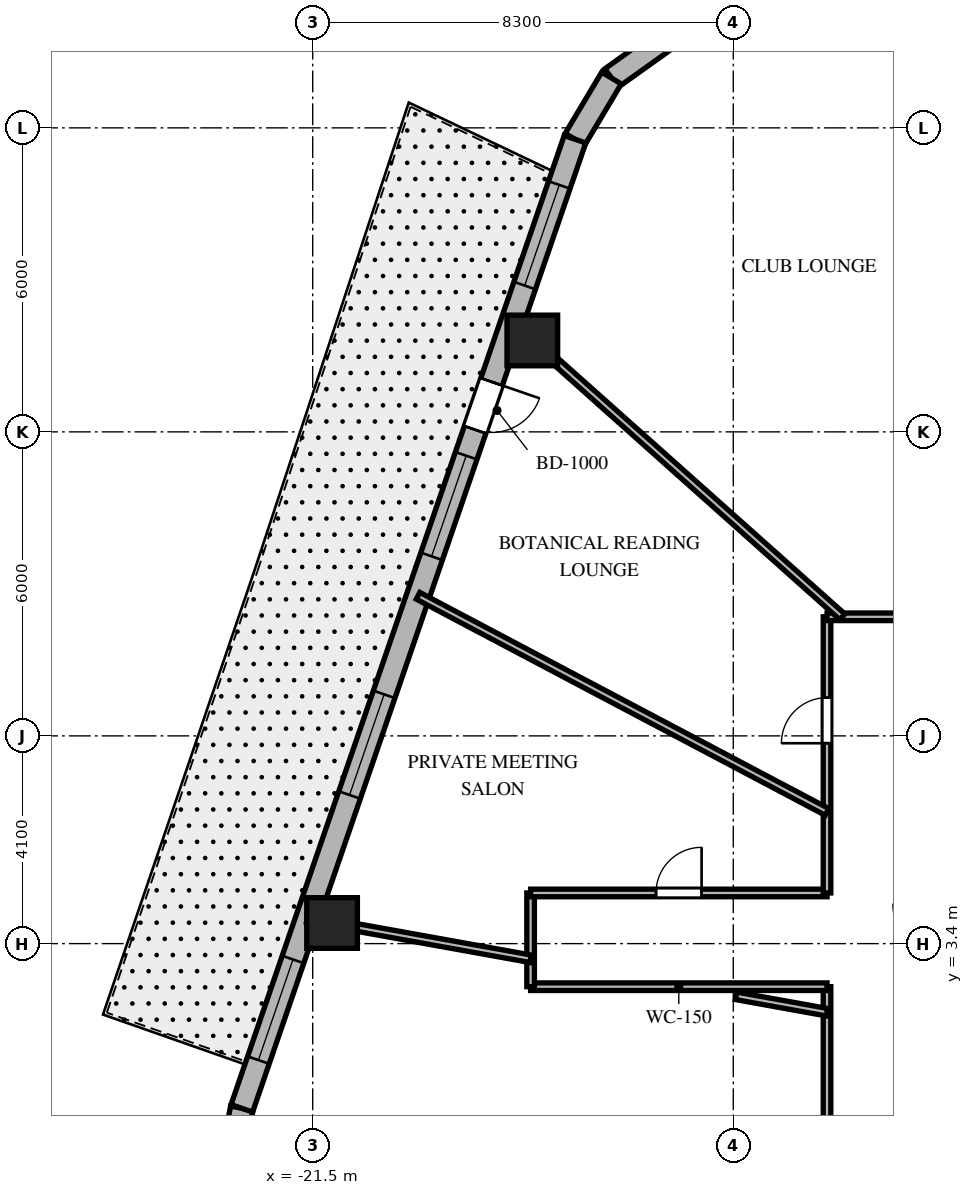
"""IFC4 building model, lengths in metres.
Left out: names, types, materials, properties, quantities, classifications, styles, units other than length and angle.
Written with IfcOpenShell. Run it as: python <this file> out.ifc"""

import sys

from ifc_helpers import new_model, si_unit, direction, frame, frame_2d, origin, origin_2d, place, context, subcontext, project, spatial, rectangle, extrude, element, fill, save


model = new_model("IFC4")
c1 = context("Model", 3, precision=1e-05, world=origin(), true_north=direction((0.0, 1.0)))
c2 = subcontext(c1, "Body", "Model", "MODEL_VIEW")
j1 = project(units=[si_unit("LENGTHUNIT", "METRE"), si_unit("PLANEANGLEUNIT", "RADIAN")], contexts=[c1])
p1 = place(None, origin())
s1 = spatial("IfcSite", under=j1, at=p1, CompositionType="ELEMENT")
p2 = place(p1, origin())
s2 = spatial("IfcBuilding", under=s1, at=p2, CompositionType="ELEMENT")
p3 = place(p2, frame((0.0, 0.0, 236.9)))
s3 = spatial("IfcBuildingStorey", under=s2, at=p3, CompositionType="ELEMENT", Elevation=236.9)
for number, where, z_axis, x_axis in (
    (1, (-17.166, 15.304, 0.0), (0.0, 0.0, 1.0), (1.0, 0.0, 0.0)),
    (2, (-21.118, 3.807, 0.0), (0.0, 0.0, 1.0), (1.0, 0.0, 0.0)),
):
    element("IfcColumn", number, at=place(p3, frame(where, z_axis=z_axis, x_axis=x_axis)), inside=s3, PredefinedType="COLUMN", context=c2, shape_type="SweptSolid", body=[
        extrude(rectangle(XDim=1.0, YDim=1.0, at=origin_2d()), origin(), (0.0, 0.0, 1.0), 3.8),
    ])
p4 = place(p3, frame((-14.478, 21.287, 0.0), z_axis=(0.0, 0.0, 1.0), x_axis=(-0.813888518617, -0.58102106611, 0.0)))
e3 = element("IfcWall", 3, at=p4, inside=s3, PredefinedType="SOLIDWALL", context=c2, shape_type="SweptSolid", body=[
    extrude(rectangle(XDim=1.383, YDim=0.45, at=frame_2d((0.691, 0.0))), origin(), (0.0, 0.0, 1.0), 3.5),
])
p5 = place(p3, frame((-15.604, 20.483, 0.0), z_axis=(0.0, 0.0, 1.0), x_axis=(-0.512222149036, -0.858852996756, 0.0)))
e4 = element("IfcWall", 4, at=p5, inside=s3, PredefinedType="SOLIDWALL", context=c2, shape_type="SweptSolid", body=[
    extrude(rectangle(XDim=1.406, YDim=0.45, at=frame_2d((0.703, 0.0))), origin(), (0.0, 0.0, 1.0), 3.5),
])
p6 = place(p3, frame((-22.898, 0.15, 0.0), z_axis=(0.0, 0.0, 1.0), x_axis=(-0.199055826889, -0.979988151858, 0.0)))
e5 = element("IfcWall", 5, at=p6, inside=s3, PredefinedType="SOLIDWALL", context=c2, shape_type="SweptSolid", body=[
    extrude(rectangle(XDim=0.894, YDim=0.45, at=frame_2d((0.447, 0.0))), origin(), (0.0, 0.0, 1.0), 3.5),
])
p7 = place(p3, frame((-16.324, 19.275, 0.0), z_axis=(0.0, 0.0, 1.0), x_axis=(-0.325083142304, -0.945685439557, 0.0)))
e6 = element("IfcWall", 6, at=p7, inside=s3, PredefinedType="SOLIDWALL", context=c2, shape_type="SweptSolid", body=[
    extrude(rectangle(XDim=20.224, YDim=0.45, at=frame_2d((10.112, 0.0))), origin(), (0.0, 0.0, 1.0), 3.5),
])
p8 = place(p7, frame((5.062, 0.0, 0.0)))
e7 = element("IfcOpeningElement", 7, at=p8, cuts=e6, PredefinedType="OPENING", context=c2, shape_type="SweptSolid", body=[
    extrude(rectangle(XDim=1.0, YDim=2.15, at=frame_2d((0.5, 1.075))), frame((0.0, 0.235, 0.0), z_axis=(0.0, -1.0, 0.0), x_axis=(1.0, 0.0, 0.0)), (0.0, 0.0, 1.0), 0.47),
])
p9 = place(p7, frame((0.953, 0.0, 0.8)))
e8 = element("IfcOpeningElement", 8, at=p9, cuts=e6, PredefinedType="OPENING", context=c2, shape_type="SweptSolid", body=[
    extrude(rectangle(XDim=2.1, YDim=1.85, at=frame_2d((1.05, 0.925))), frame((0.0, 0.235, 0.0), z_axis=(0.0, -1.0, 0.0), x_axis=(1.0, 0.0, 0.0)), (0.0, 0.0, 1.0), 0.47),
])
p10 = place(p7, frame((6.604, 0.0, 0.8)))
e9 = element("IfcOpeningElement", 9, at=p10, cuts=e6, PredefinedType="OPENING", context=c2, shape_type="SweptSolid", body=[
    extrude(rectangle(XDim=2.1, YDim=1.85, at=frame_2d((1.05, 0.925))), frame((0.0, 0.235, 0.0), z_axis=(0.0, -1.0, 0.0), x_axis=(1.0, 0.0, 0.0)), (0.0, 0.0, 1.0), 0.47),
])
p11 = place(p7, frame((11.585, 0.0, 0.8)))
e10 = element("IfcOpeningElement", 10, at=p11, cuts=e6, PredefinedType="OPENING", context=c2, shape_type="SweptSolid", body=[
    extrude(rectangle(XDim=2.1, YDim=1.85, at=frame_2d((1.05, 0.925))), frame((0.0, 0.235, 0.0), z_axis=(0.0, -1.0, 0.0), x_axis=(1.0, 0.0, 0.0)), (0.0, 0.0, 1.0), 0.47),
])
p12 = place(p7, frame((17.118, 0.0, 0.8)))
e11 = element("IfcOpeningElement", 11, at=p12, cuts=e6, PredefinedType="OPENING", context=c2, shape_type="SweptSolid", body=[
    extrude(rectangle(XDim=2.1, YDim=1.85, at=frame_2d((1.05, 0.925))), frame((0.0, 0.235, 0.0), z_axis=(0.0, -1.0, 0.0), x_axis=(1.0, 0.0, 0.0)), (0.0, 0.0, 1.0), 0.47),
])
p13 = place(p3, frame((-11.35, -9.85, 0.0), z_axis=(0.0, 0.0, 1.0), x_axis=(0.0, 1.0, 0.0)))
e12 = element("IfcWall", 12, at=p13, inside=s3, PredefinedType="PARTITIONING", context=c2, shape_type="SweptSolid", body=[
    extrude(rectangle(XDim=12.4, YDim=0.15, at=frame_2d((6.2, 0.0))), origin(), (0.0, 0.0, 1.0), 2.99),
])
p14 = place(p13, frame((8.835, 0.0, 0.0)))
e13 = element("IfcOpeningElement", 13, at=p14, cuts=e12, PredefinedType="OPENING", context=c2, shape_type="SweptSolid", body=[
    extrude(rectangle(XDim=0.95, YDim=2.03, at=frame_2d((0.475, 1.015))), frame((0.0, 0.085, 0.0), z_axis=(0.0, -1.0, 0.0), x_axis=(1.0, 0.0, 0.0)), (0.0, 0.0, 1.0), 0.17),
])
p15 = place(p13, frame((3.01, 0.0, 0.0)))
e14 = element("IfcOpeningElement", 14, at=p15, cuts=e12, PredefinedType="OPENING", context=c2, shape_type="SweptSolid", body=[
    extrude(rectangle(XDim=0.95, YDim=2.03, at=frame_2d((0.475, 1.015))), frame((0.0, 0.085, 0.0), z_axis=(0.0, -1.0, 0.0), x_axis=(1.0, 0.0, 0.0)), (0.0, 0.0, 1.0), 0.17),
])
p16 = place(p3, frame((-11.35, 2.55, 0.0), z_axis=(0.0, 0.0, 1.0), x_axis=(-1.0, 0.0, 0.0)))
e15 = element("IfcWall", 15, at=p16, inside=s3, PredefinedType="PARTITIONING", context=c2, shape_type="SweptSolid", body=[
    extrude(rectangle(XDim=5.85, YDim=0.15, at=frame_2d((2.925, 0.0))), origin(), (0.0, 0.0, 1.0), 2.941),
])
p17 = place(p3, frame((-17.2, 2.55, 0.0), z_axis=(0.0, 0.0, 1.0), x_axis=(0.0, 1.0, 0.0)))
e16 = element("IfcWall", 16, at=p17, inside=s3, PredefinedType="PARTITIONING", context=c2, shape_type="SweptSolid", body=[
    extrude(rectangle(XDim=1.85, YDim=0.15, at=frame_2d((0.925, 0.0))), origin(), (0.0, 0.0, 1.0), 2.941),
])
p18 = place(p3, frame((-17.2, 4.4, 0.0), z_axis=(0.0, 0.0, 1.0), x_axis=(1.0, 0.0, 0.0)))
e17 = element("IfcWall", 17, at=p18, inside=s3, PredefinedType="PARTITIONING", context=c2, shape_type="SweptSolid", body=[
    extrude(rectangle(XDim=5.85, YDim=0.15, at=frame_2d((2.925, 0.0))), origin(), (0.0, 0.0, 1.0), 2.941),
])
p19 = place(p18, frame((2.475, 0.0, 0.0)))
e18 = element("IfcOpeningElement", 18, at=p19, cuts=e17, PredefinedType="OPENING", context=c2, shape_type="SweptSolid", body=[
    extrude(rectangle(XDim=0.9, YDim=2.03, at=frame_2d((0.45, 1.015))), frame((0.0, 0.085, 0.0), z_axis=(0.0, -1.0, 0.0), x_axis=(1.0, 0.0, 0.0)), (0.0, 0.0, 1.0), 0.17),
])
p20 = place(p3, frame((-11.35, 4.4, 0.0), z_axis=(0.0, 0.0, 1.0), x_axis=(0.0, 1.0, 0.0)))
e19 = element("IfcWall", 19, at=p20, inside=s3, PredefinedType="PARTITIONING", context=c2, shape_type="SweptSolid", body=[
    extrude(rectangle(XDim=5.45, YDim=0.15, at=frame_2d((2.725, 0.0))), origin(), (0.0, 0.0, 1.0), 2.99),
])
p21 = place(p20, frame((2.955, 0.0, 0.0)))
e20 = element("IfcOpeningElement", 20, at=p21, cuts=e19, PredefinedType="OPENING", context=c2, shape_type="SweptSolid", body=[
    extrude(rectangle(XDim=0.9, YDim=2.03, at=frame_2d((0.45, 1.015))), frame((0.0, 0.085, 0.0), z_axis=(0.0, -1.0, 0.0), x_axis=(1.0, 0.0, 0.0)), (0.0, 0.0, 1.0), 0.17),
])
p22 = place(p3, frame((-11.35, 9.85, 0.0), z_axis=(0.0, 0.0, 1.0), x_axis=(1.0, 0.0, 0.0)))
e21 = element("IfcWall", 21, at=p22, inside=s3, PredefinedType="PARTITIONING", context=c2, shape_type="SweptSolid", body=[
    extrude(rectangle(XDim=10.43, YDim=0.15, at=frame_2d((5.215, 0.0))), origin(), (0.0, 0.0, 1.0), 2.99),
])
p23 = place(p22, frame((8.362, 0.0, 0.0)))
e22 = element("IfcOpeningElement", 22, at=p23, cuts=e21, PredefinedType="OPENING", context=c2, shape_type="SweptSolid", body=[
    extrude(rectangle(XDim=0.95, YDim=2.03, at=frame_2d((0.475, 1.015))), frame((0.0, 0.085, 0.0), z_axis=(0.0, -1.0, 0.0), x_axis=(1.0, 0.0, 0.0)), (0.0, 0.0, 1.0), 0.17),
])
p24 = place(p22, frame((3.396, 0.0, 0.0)))
e23 = element("IfcOpeningElement", 23, at=p24, cuts=e21, PredefinedType="OPENING", context=c2, shape_type="SweptSolid", body=[
    extrude(rectangle(XDim=0.95, YDim=2.03, at=frame_2d((0.475, 1.015))), frame((0.0, 0.085, 0.0), z_axis=(0.0, -1.0, 0.0), x_axis=(1.0, 0.0, 0.0)), (0.0, 0.0, 1.0), 0.17),
])
p25 = place(p3, frame((-11.048, 9.85, 0.0), z_axis=(0.0, 0.0, 1.0), x_axis=(-0.746444434655, 0.665447748492, 0.0)))
e24 = element("IfcWall", 24, at=p25, inside=s3, PredefinedType="PARTITIONING", context=c2, shape_type="SweptSolid", body=[
    extrude(rectangle(XDim=8.732, YDim=0.15, at=frame_2d((4.366, 0.0))), origin(), (0.0, 0.0, 1.0), 2.74),
])
p26 = place(p3, frame((-11.35, 5.999, 0.0), z_axis=(0.0, 0.0, 1.0), x_axis=(-0.884112301724, 0.467274478161, 0.0)))
e25 = element("IfcWall", 25, at=p26, inside=s3, PredefinedType="PARTITIONING", context=c2, shape_type="SweptSolid", body=[
    extrude(rectangle(XDim=9.129, YDim=0.15, at=frame_2d((4.564, 0.0))), origin(), (0.0, 0.0, 1.0), 2.74),
])
p27 = place(p3, frame((-11.35, 2.046, 0.0), z_axis=(0.0, 0.0, 1.0), x_axis=(-0.984127783205, 0.177461281195, 0.0)))
e26 = element("IfcWall", 26, at=p27, inside=s3, PredefinedType="PARTITIONING", context=c2, shape_type="SweptSolid", body=[
    extrude(rectangle(XDim=1.826, YDim=0.15, at=frame_2d((0.913, 0.0))), origin(), (0.0, 0.0, 1.0), 3.5),
])
p28 = place(p3, frame((-17.2, 3.101, 0.0), z_axis=(0.0, 0.0, 1.0), x_axis=(-0.98413465883, 0.177423147559, 0.0)))
e27 = element("IfcWall", 27, at=p28, inside=s3, PredefinedType="PARTITIONING", context=c2, shape_type="SweptSolid", body=[
    extrude(rectangle(XDim=4.482, YDim=0.15, at=frame_2d((2.241, 0.0))), origin(), (0.0, 0.0, 1.0), 2.74),
])
p29 = place(p8, origin())
e28 = element("IfcDoor", 28, at=p29, inside=s3, OperationType="SINGLE_SWING_LEFT", PredefinedType="DOOR", context=c2, shape_type="SweptSolid", body=[
    extrude(rectangle(XDim=1.0, YDim=2.15, at=frame_2d((0.5, 1.075))), frame((0.0, 0.025, 0.0), z_axis=(0.0, -1.0, 0.0), x_axis=(1.0, 0.0, 0.0)), (0.0, 0.0, 1.0), 0.05),
])
fill(e7, e28)
p30 = place(p9, origin())
e29 = element("IfcWindow", 29, at=p30, inside=s3, PartitioningType="SINGLE_PANEL", PredefinedType="WINDOW", context=c2, shape_type="SweptSolid", body=[
    extrude(rectangle(XDim=2.1, YDim=1.85, at=frame_2d((1.05, 0.925))), frame((0.0, 0.03, 0.0), z_axis=(0.0, -1.0, 0.0), x_axis=(1.0, 0.0, 0.0)), (0.0, 0.0, 1.0), 0.06),
])
fill(e8, e29)
p31 = place(p10, origin())
e30 = element("IfcWindow", 30, at=p31, inside=s3, PartitioningType="SINGLE_PANEL", PredefinedType="WINDOW", context=c2, shape_type="SweptSolid", body=[
    extrude(rectangle(XDim=2.1, YDim=1.85, at=frame_2d((1.05, 0.925))), frame((0.0, 0.03, 0.0), z_axis=(0.0, -1.0, 0.0), x_axis=(1.0, 0.0, 0.0)), (0.0, 0.0, 1.0), 0.06),
])
fill(e9, e30)
p32 = place(p11, origin())
e31 = element("IfcWindow", 31, at=p32, inside=s3, PartitioningType="SINGLE_PANEL", PredefinedType="WINDOW", context=c2, shape_type="SweptSolid", body=[
    extrude(rectangle(XDim=2.1, YDim=1.85, at=frame_2d((1.05, 0.925))), frame((0.0, 0.03, 0.0), z_axis=(0.0, -1.0, 0.0), x_axis=(1.0, 0.0, 0.0)), (0.0, 0.0, 1.0), 0.06),
])
fill(e10, e31)
p33 = place(p12, origin())
e32 = element("IfcWindow", 32, at=p33, inside=s3, PartitioningType="SINGLE_PANEL", PredefinedType="WINDOW", context=c2, shape_type="SweptSolid", body=[
    extrude(rectangle(XDim=2.1, YDim=1.85, at=frame_2d((1.05, 0.925))), frame((0.0, 0.03, 0.0), z_axis=(0.0, -1.0, 0.0), x_axis=(1.0, 0.0, 0.0)), (0.0, 0.0, 1.0), 0.06),
])
fill(e11, e32)
p34 = place(p21, origin())
e33 = element("IfcDoor", 33, at=p34, inside=s3, OperationType="SINGLE_SWING_LEFT", PredefinedType="DOOR", context=c2, shape_type="SweptSolid", body=[
    extrude(rectangle(XDim=0.9, YDim=2.03, at=frame_2d((0.45, 1.015))), frame((0.0, 0.025, 0.0), z_axis=(0.0, -1.0, 0.0), x_axis=(1.0, 0.0, 0.0)), (0.0, 0.0, 1.0), 0.05),
])
fill(e20, e33)
p35 = place(p19, origin())
e34 = element("IfcDoor", 34, at=p35, inside=s3, OperationType="SINGLE_SWING_RIGHT", PredefinedType="DOOR", context=c2, shape_type="SweptSolid", body=[
    extrude(rectangle(XDim=0.9, YDim=2.03, at=frame_2d((0.45, 1.015))), frame((0.0, 0.025, 0.0), z_axis=(0.0, -1.0, 0.0), x_axis=(1.0, 0.0, 0.0)), (0.0, 0.0, 1.0), 0.05),
])
fill(e18, e34)
save(model, sys.argv[1])
